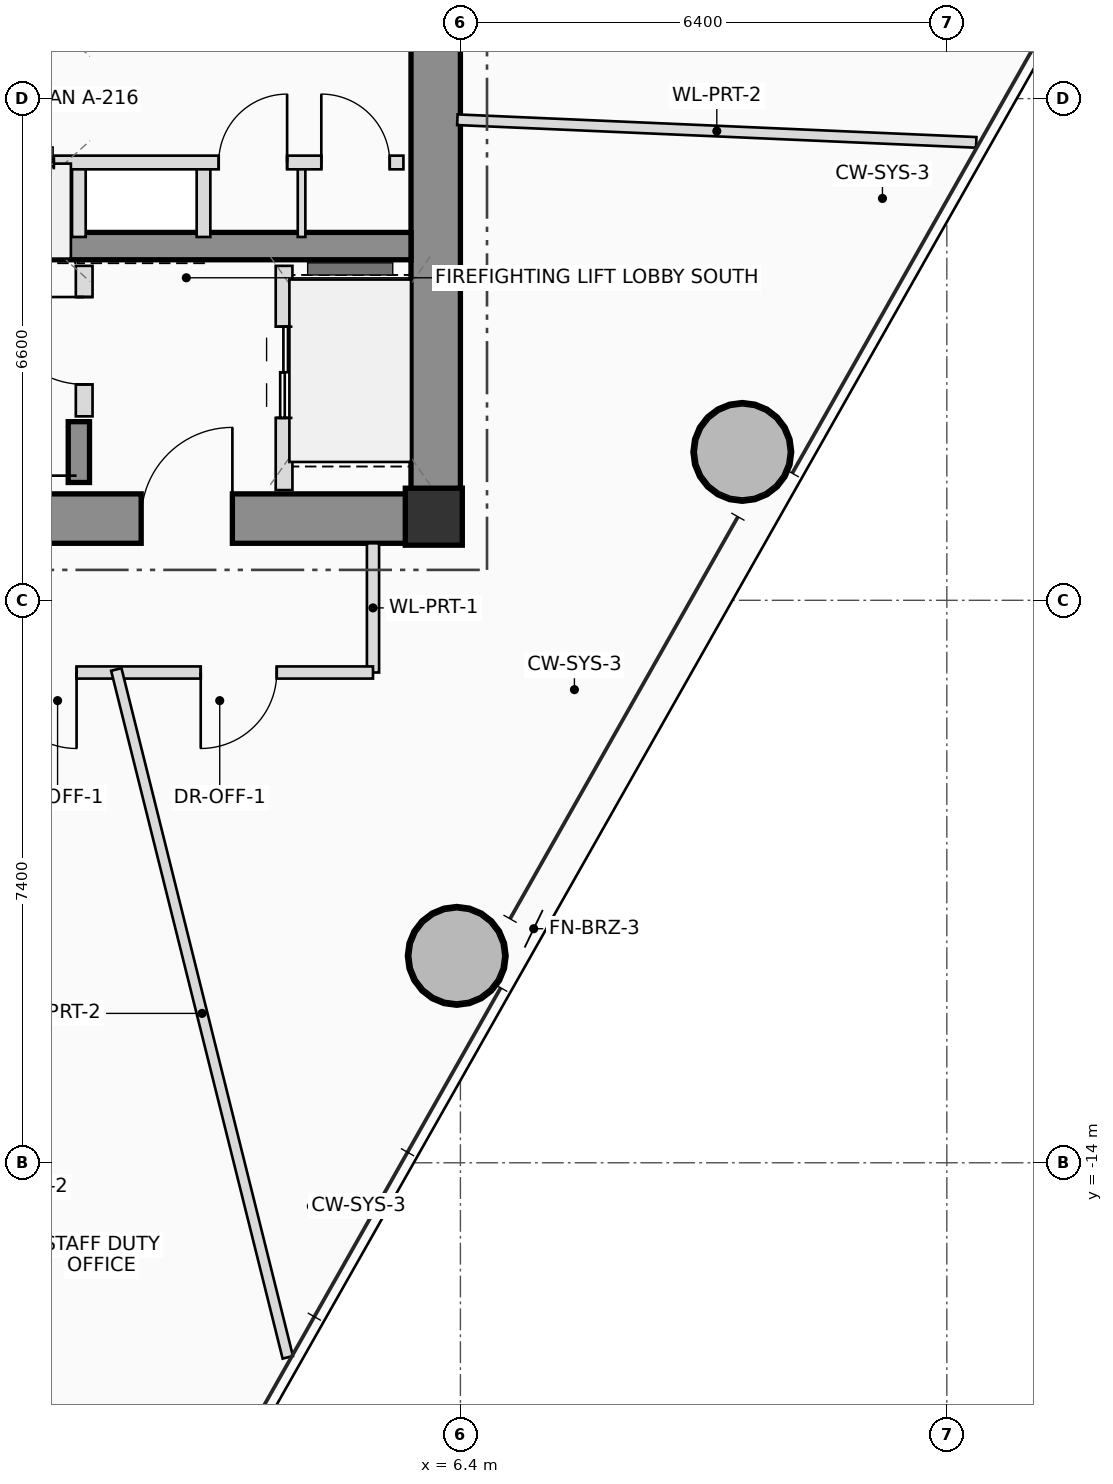
"""IFC4 building model, lengths in metres.
Left out: names, types, materials, properties, quantities, classifications, styles, units other than length and angle.
Written with IfcOpenShell. Run it as: python <this file> out.ifc"""

import sys

from ifc_helpers import new_model, si_unit, direction, frame, frame_2d, origin, origin_2d, place, context, subcontext, project, spatial, rectangle, hollow_circle, extrude, source, transform, mapped, element, fill, save


model = new_model("IFC4")
c1 = context("Model", 3, precision=1e-05, world=origin(), true_north=direction((0.0, 1.0)))
c2 = subcontext(c1, "Body", "Model", "MODEL_VIEW")
j1 = project(units=[si_unit("LENGTHUNIT", "METRE"), si_unit("PLANEANGLEUNIT", "RADIAN")], contexts=[c1])
p1 = place(None, origin())
s1 = spatial("IfcSite", under=j1, at=p1, CompositionType="ELEMENT")
p2 = place(p1, origin())
s2 = spatial("IfcBuilding", under=s1, at=p2, CompositionType="ELEMENT")
p3 = place(p2, frame((0.0, 0.0, 176.0)))
s3 = spatial("IfcBuildingStorey", under=s2, at=p3, CompositionType="ELEMENT", Elevation=176.0)
m1 = source(origin(), c2, "Body", "SweptSolid", [
    extrude(rectangle(XDim=0.75, YDim=0.75, at=origin_2d()), origin(), (0.0, 0.0, 1.0), 3.45),
])
p4 = place(p3, frame((6.05, -5.5, 0.0), z_axis=(0.0, 0.0, 1.0), x_axis=(1.0, 0.0, 0.0)))
e1 = element("IfcColumn", 1, at=p4, inside=s3, PredefinedType="COLUMN", context=c2, shape_type="MappedRepresentation", body=[
    mapped(m1, transform((0.0, 0.0, 0.0), scale=1.0)),
])
p5 = place(p3, frame((-6.4, -5.525, 0.0), z_axis=(0.0, 0.0, 1.0), x_axis=(1.0, 0.0, 0.0)))
e2 = element("IfcWall", 2, at=p5, inside=s3, PredefinedType="SHEAR", context=c2, shape_type="SweptSolid", body=[
    extrude(rectangle(XDim=12.8, YDim=0.65, at=frame_2d((6.4, 0.0))), origin(), (0.0, 0.0, 1.0), 3.45),
])
p6 = place(p5, frame((8.6, 0.0, 0.0)))
e3 = element("IfcOpeningElement", 3, at=p6, cuts=e2, PredefinedType="OPENING", context=c2, shape_type="SweptSolid", body=[
    extrude(rectangle(XDim=1.2, YDim=2.2, at=frame_2d((0.6, 1.1))), frame((0.0, 0.335, 0.0), z_axis=(0.0, -1.0, 0.0), x_axis=(1.0, 0.0, 0.0)), (0.0, 0.0, 1.0), 0.67),
])
p7 = place(p3, frame((6.075, -5.2, 0.0), z_axis=(0.0, 0.0, 1.0), x_axis=(0.0, 1.0, 0.0)))
e4 = element("IfcWall", 4, at=p7, inside=s3, PredefinedType="SHEAR", context=c2, shape_type="SweptSolid", body=[
    extrude(rectangle(XDim=10.4, YDim=0.65, at=frame_2d((5.2, 0.0))), origin(), (0.0, 0.0, 1.0), 3.45),
])
p8 = place(p3, frame((-5.75, -1.94, 0.0), z_axis=(0.0, 0.0, 1.0), x_axis=(1.0, 0.0, 0.0)))
e5 = element("IfcWall", 5, at=p8, inside=s3, PredefinedType="SHEAR", context=c2, shape_type="SweptSolid", body=[
    extrude(rectangle(XDim=11.5, YDim=0.36, at=frame_2d((5.75, 0.0))), origin(), (0.0, 0.0, 1.0), 3.45),
])
p9 = place(p3, frame((1.38, -5.05, 0.0), z_axis=(0.0, 0.0, 1.0), x_axis=(0.0, 1.0, 0.0)))
e6 = element("IfcWall", 6, at=p9, inside=s3, PredefinedType="SHEAR", context=c2, shape_type="SweptSolid", body=[
    extrude(rectangle(XDim=0.8, YDim=0.28, at=frame_2d((0.4, 0.0))), origin(), (0.0, 0.0, 1.0), 3.45),
])
m2 = source(origin(), c2, "Body", "SweptSolid", [
    extrude(hollow_circle(Radius=0.65, WallThickness=0.045, at=origin_2d()), origin(), (0.0, 0.0, 1.0), 3.45),
])
for number, where, z_axis, x_axis in (
    (7, (6.352, -11.278, 0.0), (0.0, 0.0, 1.0), (1.0, 0.0, 0.0)),
    (8, (10.109, -4.648, 0.0), (0.0, 0.0, 1.0), (1.0, 0.0, 0.0)),
):
    element("IfcColumn", number, at=place(p3, frame(where, z_axis=z_axis, x_axis=x_axis)), inside=s3, PredefinedType="COLUMN", context=c2, shape_type="MappedRepresentation", body=[
        mapped(m2, transform((0.0, 0.0, 0.0), scale=1.0)),
    ])
p10 = place(p3, frame((1.45, -4.18, 0.0), z_axis=(0.0, 0.0, 1.0), x_axis=(0.0, 1.0, 0.0)))
e9 = element("IfcWall", 9, at=p10, inside=s3, PredefinedType="PLUMBINGWALL", context=c2, shape_type="SweptSolid", body=[
    extrude(rectangle(XDim=1.98, YDim=0.22, at=frame_2d((0.99, 0.0))), origin(), (0.0, 0.0, 1.0), 3.25),
])
p11 = place(p10, frame((0.42, 0.0, 0.0)))
e10 = element("IfcOpeningElement", 10, at=p11, cuts=e9, PredefinedType="OPENING", context=c2, shape_type="SweptSolid", body=[
    extrude(rectangle(XDim=1.15, YDim=2.15, at=frame_2d((0.575, 1.075))), frame((0.0, 0.12, 0.0), z_axis=(0.0, -1.0, 0.0), x_axis=(1.0, 0.0, 0.0)), (0.0, 0.0, 1.0), 0.24),
])
p12 = place(p3, frame((4.08, -5.15, 0.0), z_axis=(0.0, 0.0, 1.0), x_axis=(0.0, 1.0, 0.0)))
e11 = element("IfcWall", 11, at=p12, inside=s3, PredefinedType="PLUMBINGWALL", context=c2, shape_type="SweptSolid", body=[
    extrude(rectangle(XDim=2.95, YDim=0.22, at=frame_2d((1.475, 0.0))), origin(), (0.0, 0.0, 1.0), 3.25),
])
p13 = place(p12, frame((0.95, 0.0, 0.0)))
e12 = element("IfcOpeningElement", 12, at=p13, cuts=e11, PredefinedType="OPENING", context=c2, shape_type="SweptSolid", body=[
    extrude(rectangle(XDim=1.2, YDim=2.25, at=frame_2d((0.6, 1.125))), frame((0.0, 0.12, 0.0), z_axis=(0.0, -1.0, 0.0), x_axis=(1.0, 0.0, 0.0)), (0.0, 0.0, 1.0), 0.24),
])
for number, where, z_axis, x_axis in (
    (13, (1.38, -1.82, 0.0), (0.0, 0.0, 1.0), (0.0, 1.0, 0.0)),
    (14, (3.02, -1.82, 0.0), (0.0, 0.0, 1.0), (0.0, 1.0, 0.0)),
):
    element("IfcWall", number, at=place(p3, frame(where, z_axis=z_axis, x_axis=x_axis)), inside=s3, PredefinedType="PLUMBINGWALL", context=c2, shape_type="SweptSolid", body=[
        extrude(rectangle(XDim=0.98, YDim=0.18, at=frame_2d((0.49, 0.0))), origin(), (0.0, 0.0, 1.0), 3.25),
    ])
p14 = place(p3, frame((4.31, -1.82, 0.0), z_axis=(0.0, 0.0, 1.0), x_axis=(0.0, 1.0, 0.0)))
e15 = element("IfcWall", 15, at=p14, inside=s3, PredefinedType="PARTITIONING", context=c2, shape_type="SweptSolid", body=[
    extrude(rectangle(XDim=0.98, YDim=0.1, at=frame_2d((0.49, 0.0))), origin(), (0.0, 0.0, 1.0), 3.25),
])
p15 = place(p3, frame((-5.68, -0.84, 0.0), z_axis=(0.0, 0.0, 1.0), x_axis=(1.0, 0.0, 0.0)))
e16 = element("IfcWall", 16, at=p15, inside=s3, PredefinedType="PLUMBINGWALL", context=c2, shape_type="SweptSolid", body=[
    extrude(rectangle(XDim=11.33, YDim=0.18, at=frame_2d((5.665, 0.0))), origin(), (0.0, 0.0, 1.0), 3.25),
])
p16 = place(p15, frame((1.18, 0.0, 0.0)))
e17 = element("IfcOpeningElement", 17, at=p16, cuts=e16, PredefinedType="OPENING", context=c2, shape_type="SweptSolid", body=[
    extrude(rectangle(XDim=0.9, YDim=2.05, at=frame_2d((0.45, 1.025))), frame((0.0, 0.1, 0.0), z_axis=(0.0, -1.0, 0.0), x_axis=(1.0, 0.0, 0.0)), (0.0, 0.0, 1.0), 0.2),
])
p17 = place(p15, frame((3.93, 0.0, 0.0)))
e18 = element("IfcOpeningElement", 18, at=p17, cuts=e16, PredefinedType="OPENING", context=c2, shape_type="SweptSolid", body=[
    extrude(rectangle(XDim=1.1, YDim=2.2, at=frame_2d((0.55, 1.1))), frame((0.0, 0.1, 0.0), z_axis=(0.0, -1.0, 0.0), x_axis=(1.0, 0.0, 0.0)), (0.0, 0.0, 1.0), 0.2),
])
p18 = place(p15, frame((5.63, 0.0, 0.0)))
e19 = element("IfcOpeningElement", 19, at=p18, cuts=e16, PredefinedType="OPENING", context=c2, shape_type="SweptSolid", body=[
    extrude(rectangle(XDim=1.1, YDim=2.2, at=frame_2d((0.55, 1.1))), frame((0.0, 0.1, 0.0), z_axis=(0.0, -1.0, 0.0), x_axis=(1.0, 0.0, 0.0)), (0.0, 0.0, 1.0), 0.2),
])
p19 = place(p15, frame((8.9, 0.0, 0.0)))
e20 = element("IfcOpeningElement", 20, at=p19, cuts=e16, PredefinedType="OPENING", context=c2, shape_type="SweptSolid", body=[
    extrude(rectangle(XDim=0.9, YDim=2.05, at=frame_2d((0.45, 1.025))), frame((0.0, 0.1, 0.0), z_axis=(0.0, -1.0, 0.0), x_axis=(1.0, 0.0, 0.0)), (0.0, 0.0, 1.0), 0.2),
])
p20 = place(p15, frame((10.25, 0.0, 0.0)))
e21 = element("IfcOpeningElement", 21, at=p20, cuts=e16, PredefinedType="OPENING", context=c2, shape_type="SweptSolid", body=[
    extrude(rectangle(XDim=0.9, YDim=2.05, at=frame_2d((0.45, 1.025))), frame((0.0, 0.1, 0.0), z_axis=(0.0, -1.0, 0.0), x_axis=(1.0, 0.0, 0.0)), (0.0, 0.0, 1.0), 0.2),
])
p21 = place(p3, frame((5.25, -5.85, 0.0), z_axis=(0.0, 0.0, 1.0), x_axis=(0.0, -1.0, 0.0)))
e22 = element("IfcWall", 22, at=p21, inside=s3, PredefinedType="PARTITIONING", context=c2, shape_type="SweptSolid", body=[
    extrude(rectangle(XDim=1.7, YDim=0.16, at=frame_2d((0.85, 0.0))), origin(), (0.0, 0.0, 1.0), 3.25),
])
p22 = place(p3, frame((5.25, -7.55, 0.0), z_axis=(0.0, 0.0, 1.0), x_axis=(-1.0, 0.0, 0.0)))
e23 = element("IfcWall", 23, at=p22, inside=s3, PredefinedType="PARTITIONING", context=c2, shape_type="SweptSolid", body=[
    extrude(rectangle(XDim=11.61, YDim=0.16, at=frame_2d((5.805, 0.0))), origin(), (0.0, 0.0, 1.0), 2.605),
])
p23 = place(p22, frame((1.267, 0.0, 0.0)))
e24 = element("IfcOpeningElement", 24, at=p23, cuts=e23, PredefinedType="OPENING", context=c2, shape_type="SweptSolid", body=[
    extrude(rectangle(XDim=1.0, YDim=2.25, at=frame_2d((0.5, 1.125))), frame((0.0, 0.09, 0.0), z_axis=(0.0, -1.0, 0.0), x_axis=(1.0, 0.0, 0.0)), (0.0, 0.0, 1.0), 0.18),
])
p24 = place(p22, frame((3.9, 0.0, 0.0)))
e25 = element("IfcOpeningElement", 25, at=p24, cuts=e23, PredefinedType="OPENING", context=c2, shape_type="SweptSolid", body=[
    extrude(rectangle(XDim=1.0, YDim=2.25, at=frame_2d((0.5, 1.125))), frame((0.0, 0.09, 0.0), z_axis=(0.0, -1.0, 0.0), x_axis=(1.0, 0.0, 0.0)), (0.0, 0.0, 1.0), 0.18),
])
p25 = place(p22, frame((7.936, 0.0, 0.0)))
e26 = element("IfcOpeningElement", 26, at=p25, cuts=e23, PredefinedType="OPENING", context=c2, shape_type="SweptSolid", body=[
    extrude(rectangle(XDim=1.0, YDim=2.25, at=frame_2d((0.5, 1.125))), frame((0.0, 0.09, 0.0), z_axis=(0.0, -1.0, 0.0), x_axis=(1.0, 0.0, 0.0)), (0.0, 0.0, 1.0), 0.18),
])
p26 = place(p3, frame((6.36, -0.278, 0.0), z_axis=(0.0, 0.0, 1.0), x_axis=(0.999047983793, -0.043624833281, 0.0)))
e27 = element("IfcWall", 27, at=p26, inside=s3, PredefinedType="PARTITIONING", context=c2, shape_type="SweptSolid", body=[
    extrude(rectangle(XDim=6.833, YDim=0.14, at=frame_2d((3.417, 0.0))), origin(), (0.0, 0.0, 1.0), 2.605),
])
p27 = place(p3, frame((1.873, -7.51, 0.0), z_axis=(0.0, 0.0, 1.0), x_axis=(0.241919667538, -0.970296281791, 0.0)))
e28 = element("IfcWall", 28, at=p27, inside=s3, PredefinedType="PARTITIONING", context=c2, shape_type="SweptSolid", body=[
    extrude(rectangle(XDim=9.327, YDim=0.14, at=frame_2d((4.664, 0.0))), origin(), (0.0, 0.0, 1.0), 2.605),
])
p28 = place(p6, origin())
e29 = element("IfcDoor", 29, at=p28, inside=s3, OperationType="SINGLE_SWING_RIGHT", PredefinedType="DOOR", context=c2, shape_type="SweptSolid", body=[
    extrude(rectangle(XDim=1.2, YDim=2.2, at=frame_2d((0.6, 1.1))), frame((0.0, 0.025, 0.0), z_axis=(0.0, -1.0, 0.0), x_axis=(1.0, 0.0, 0.0)), (0.0, 0.0, 1.0), 0.05),
])
fill(e3, e29)
p29 = place(p11, origin())
e30 = element("IfcDoor", 30, at=p29, inside=s3, OperationType="SINGLE_SWING_RIGHT", PredefinedType="DOOR", context=c2, shape_type="SweptSolid", body=[
    extrude(rectangle(XDim=1.15, YDim=2.15, at=frame_2d((0.575, 1.075))), frame((0.0, 0.025, 0.0), z_axis=(0.0, -1.0, 0.0), x_axis=(1.0, 0.0, 0.0)), (0.0, 0.0, 1.0), 0.05),
])
fill(e10, e30)
p30 = place(p13, origin())
e31 = element("IfcDoor", 31, at=p30, inside=s3, OperationType="DOUBLE_DOOR_SLIDING", PredefinedType="DOOR", context=c2, shape_type="SweptSolid", body=[
    extrude(rectangle(XDim=1.2, YDim=2.25, at=frame_2d((0.6, 1.125))), frame((0.0, 0.025, 0.0), z_axis=(0.0, -1.0, 0.0), x_axis=(1.0, 0.0, 0.0)), (0.0, 0.0, 1.0), 0.05),
])
fill(e12, e31)
p31 = place(p18, origin())
e32 = element("IfcDoor", 32, at=p31, inside=s3, OperationType="DOUBLE_DOOR_SLIDING", PredefinedType="DOOR", context=c2, shape_type="SweptSolid", body=[
    extrude(rectangle(XDim=1.1, YDim=2.2, at=frame_2d((0.55, 1.1))), frame((0.0, 0.025, 0.0), z_axis=(0.0, -1.0, 0.0), x_axis=(1.0, 0.0, 0.0)), (0.0, 0.0, 1.0), 0.05),
])
fill(e19, e32)
p32 = place(p19, origin())
e33 = element("IfcDoor", 33, at=p32, inside=s3, OperationType="SINGLE_SWING_RIGHT", PredefinedType="DOOR", context=c2, shape_type="SweptSolid", body=[
    extrude(rectangle(XDim=0.9, YDim=2.05, at=frame_2d((0.45, 1.025))), frame((0.0, 0.025, 0.0), z_axis=(0.0, -1.0, 0.0), x_axis=(1.0, 0.0, 0.0)), (0.0, 0.0, 1.0), 0.05),
])
fill(e20, e33)
p33 = place(p20, origin())
e34 = element("IfcDoor", 34, at=p33, inside=s3, OperationType="SINGLE_SWING_LEFT", PredefinedType="DOOR", context=c2, shape_type="SweptSolid", body=[
    extrude(rectangle(XDim=0.9, YDim=2.05, at=frame_2d((0.45, 1.025))), frame((0.0, 0.025, 0.0), z_axis=(0.0, -1.0, 0.0), x_axis=(1.0, 0.0, 0.0)), (0.0, 0.0, 1.0), 0.05),
])
fill(e21, e34)
p34 = place(p23, origin())
e35 = element("IfcDoor", 35, at=p34, inside=s3, OperationType="SINGLE_SWING_RIGHT", PredefinedType="DOOR", context=c2, shape_type="SweptSolid", body=[
    extrude(rectangle(XDim=1.0, YDim=2.25, at=frame_2d((0.5, 1.125))), frame((0.0, 0.025, 0.0), z_axis=(0.0, -1.0, 0.0), x_axis=(1.0, 0.0, 0.0)), (0.0, 0.0, 1.0), 0.05),
])
fill(e24, e35)
p35 = place(p24, origin())
e36 = element("IfcDoor", 36, at=p35, inside=s3, OperationType="SINGLE_SWING_LEFT", PredefinedType="DOOR", context=c2, shape_type="SweptSolid", body=[
    extrude(rectangle(XDim=1.0, YDim=2.25, at=frame_2d((0.5, 1.125))), frame((0.0, 0.025, 0.0), z_axis=(0.0, -1.0, 0.0), x_axis=(1.0, 0.0, 0.0)), (0.0, 0.0, 1.0), 0.05),
])
fill(e25, e36)
save(model, sys.argv[1])
